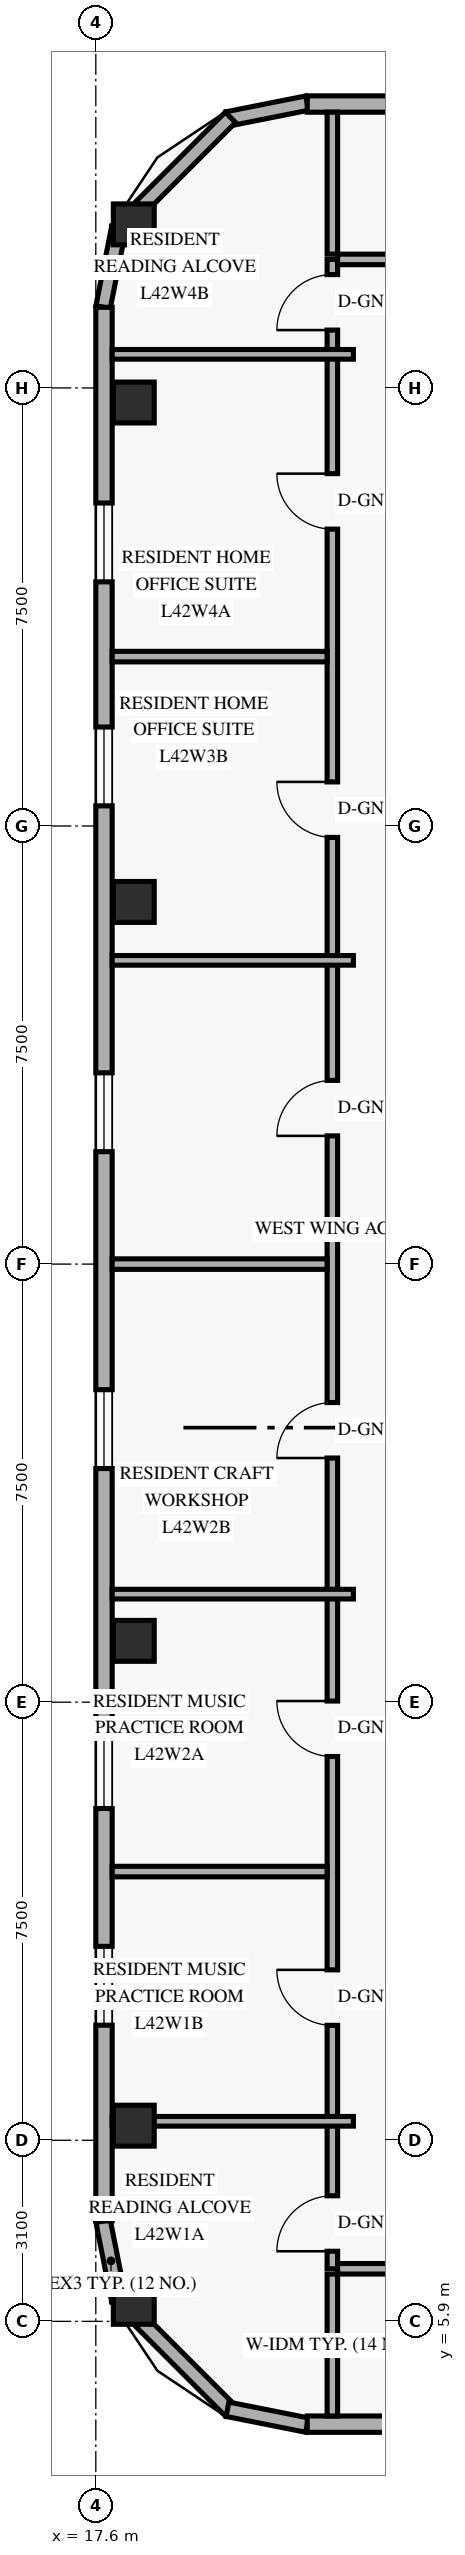
"""IFC4 building model, lengths in metres.
Left out: names, types, materials, properties, quantities, classifications, styles, units other than length and angle.
Written with IfcOpenShell. Run it as: python <this file> out.ifc"""

import sys

from ifc_helpers import new_model, si_unit, direction, frame, frame_2d, origin, origin_2d, place, context, subcontext, project, spatial, rectangle, extrude, element, fill, save


model = new_model("IFC4")
c1 = context("Model", 3, precision=1e-05, world=origin(), true_north=direction((0.0, 1.0)))
c2 = subcontext(c1, "Body", "Model", "MODEL_VIEW")
j1 = project(units=[si_unit("LENGTHUNIT", "METRE"), si_unit("PLANEANGLEUNIT", "RADIAN")], contexts=[c1])
p1 = place(None, origin())
s1 = spatial("IfcSite", under=j1, at=p1, CompositionType="ELEMENT")
p2 = place(p1, origin())
s2 = spatial("IfcBuilding", under=s1, at=p2, CompositionType="ELEMENT")
p3 = place(p2, frame((0.0, 0.0, 162.6)))
s3 = spatial("IfcBuildingStorey", under=s2, at=p3, CompositionType="ELEMENT", Elevation=162.6)
for number, where, z_axis, x_axis in (
    (1, (18.25, 6.2, 0.0), (0.0, 0.0, 1.0), (1.0, 0.0, 0.0)),
    (2, (18.25, 9.25, 0.0), (0.0, 0.0, 1.0), (1.0, 0.0, 0.0)),
    (3, (18.25, 17.55, 0.0), (0.0, 0.0, 1.0), (1.0, 0.0, 0.0)),
    (4, (18.25, 30.2, 0.0), (0.0, 0.0, 1.0), (1.0, 0.0, 0.0)),
    (5, (18.25, 38.75, 0.0), (0.0, 0.0, 1.0), (1.0, 0.0, 0.0)),
    (6, (18.25, 41.8, 0.0), (0.0, 0.0, 1.0), (1.0, 0.0, 0.0)),
):
    element("IfcColumn", number, at=place(p3, frame(where, z_axis=z_axis, x_axis=x_axis)), inside=s3, PredefinedType="COLUMN", context=c2, shape_type="SweptSolid", body=[
        extrude(rectangle(XDim=0.7, YDim=0.7, at=origin_2d()), origin(), (0.0, 0.0, 1.0), 3.6),
    ])
p4 = place(p3, frame((17.724, 7.616, 0.0), z_axis=(0.0, 0.0, 1.0), x_axis=(0.195135625965, -0.9807762678, 0.0)))
e7 = element("IfcWall", 7, at=p4, inside=s3, PredefinedType="SOLIDWALL", context=c2, shape_type="SweptSolid", body=[
    extrude(rectangle(XDim=1.389, YDim=0.25, at=frame_2d((0.694, 0.0))), origin(), (0.0, 0.0, 1.0), 3.36),
])
p5 = place(p3, frame((17.968, 6.305, 0.0), z_axis=(0.0, 0.0, 1.0), x_axis=(0.707106781187, -0.707106781187, 0.0)))
e8 = element("IfcWall", 8, at=p5, inside=s3, PredefinedType="SOLIDWALL", context=c2, shape_type="SweptSolid", body=[
    extrude(rectangle(XDim=2.739, YDim=0.25, at=frame_2d((1.37, 0.0))), origin(), (0.0, 0.0, 1.0), 3.36),
])
for number, where, z_axis, x_axis in (
    (9, (19.854, 4.395, 0.0), (0.0, 0.0, 1.0), (0.981, -0.195, 0.0)),
    (10, (21.217, 43.876, 0.0), (0.0, 0.0, 1.0), (-0.981, -0.195, 0.0)),
):
    element("IfcWall", number, at=place(p3, frame(where, z_axis=z_axis, x_axis=x_axis)), inside=s3, PredefinedType="SOLIDWALL", context=c2, shape_type="SweptSolid", body=[
        extrude(rectangle(XDim=1.389, YDim=0.25, at=frame_2d((0.694, 0.0))), origin(), (0.0, 0.0, 1.0), 3.36),
    ])
p6 = place(p3, frame((19.905, 43.632, 0.0), z_axis=(0.0, 0.0, 1.0), x_axis=(-0.707106781187, -0.707106781187, 0.0)))
e11 = element("IfcWall", 11, at=p6, inside=s3, PredefinedType="SOLIDWALL", context=c2, shape_type="SweptSolid", body=[
    extrude(rectangle(XDim=2.739, YDim=0.25, at=frame_2d((1.37, 0.0))), origin(), (0.0, 0.0, 1.0), 3.36),
])
p7 = place(p3, frame((17.995, 41.746, 0.0), z_axis=(0.0, 0.0, 1.0), x_axis=(-0.195135625965, -0.9807762678, 0.0)))
e12 = element("IfcWall", 12, at=p7, inside=s3, PredefinedType="SOLIDWALL", context=c2, shape_type="SweptSolid", body=[
    extrude(rectangle(XDim=1.389, YDim=0.25, at=frame_2d((0.694, 0.0))), origin(), (0.0, 0.0, 1.0), 3.36),
])
p8 = place(p3, frame((21.22, 4.14, 0.0), z_axis=(0.0, 0.0, 1.0), x_axis=(1.0, 0.0, 0.0)))
e13 = element("IfcWall", 13, at=p8, inside=s3, PredefinedType="SOLIDWALL", context=c2, shape_type="SweptSolid", body=[
    extrude(rectangle(XDim=5.43, YDim=0.28, at=frame_2d((2.715, 0.0))), origin(), (0.0, 0.0, 1.0), 3.36),
])
p9 = place(p8, frame((2.18, 0.0, 0.85)))
e14 = element("IfcOpeningElement", 14, at=p9, cuts=e13, PredefinedType="OPENING", context=c2, shape_type="SweptSolid", body=[
    extrude(rectangle(XDim=1.5, YDim=1.55, at=frame_2d((0.75, 0.775))), frame((0.0, 0.15, 0.0), z_axis=(0.0, -1.0, 0.0), x_axis=(1.0, 0.0, 0.0)), (0.0, 0.0, 1.0), 0.3),
])
p10 = place(p3, frame((54.98, 43.86, 0.0), z_axis=(0.0, 0.0, 1.0), x_axis=(-1.0, 0.0, 0.0)))
e15 = element("IfcWall", 15, at=p10, inside=s3, PredefinedType="SOLIDWALL", context=c2, shape_type="SweptSolid", body=[
    extrude(rectangle(XDim=33.76, YDim=0.28, at=frame_2d((16.88, 0.0))), origin(), (0.0, 0.0, 1.0), 3.36),
])
p11 = place(p10, frame((28.78, 0.0, 0.85)))
e16 = element("IfcOpeningElement", 16, at=p11, cuts=e15, PredefinedType="OPENING", context=c2, shape_type="SweptSolid", body=[
    extrude(rectangle(XDim=1.2, YDim=1.5, at=frame_2d((0.6, 0.75))), frame((0.0, 0.15, 0.0), z_axis=(0.0, -1.0, 0.0), x_axis=(1.0, 0.0, 0.0)), (0.0, 0.0, 1.0), 0.3),
])
p12 = place(p10, frame((21.895, 0.0, 0.85)))
e17 = element("IfcOpeningElement", 17, at=p12, cuts=e15, PredefinedType="OPENING", context=c2, shape_type="SweptSolid", body=[
    extrude(rectangle(XDim=1.2, YDim=1.5, at=frame_2d((0.6, 0.75))), frame((0.0, 0.15, 0.0), z_axis=(0.0, -1.0, 0.0), x_axis=(1.0, 0.0, 0.0)), (0.0, 0.0, 1.0), 0.3),
])
p13 = place(p10, frame((15.221, 0.0, 0.85)))
e18 = element("IfcOpeningElement", 18, at=p13, cuts=e15, PredefinedType="OPENING", context=c2, shape_type="SweptSolid", body=[
    extrude(rectangle(XDim=1.2, YDim=1.5, at=frame_2d((0.6, 0.75))), frame((0.0, 0.15, 0.0), z_axis=(0.0, -1.0, 0.0), x_axis=(1.0, 0.0, 0.0)), (0.0, 0.0, 1.0), 0.3),
])
p14 = place(p10, frame((8.031, 0.0, 0.85)))
e19 = element("IfcOpeningElement", 19, at=p14, cuts=e15, PredefinedType="OPENING", context=c2, shape_type="SweptSolid", body=[
    extrude(rectangle(XDim=1.2, YDim=1.5, at=frame_2d((0.6, 0.75))), frame((0.0, 0.15, 0.0), z_axis=(0.0, -1.0, 0.0), x_axis=(1.0, 0.0, 0.0)), (0.0, 0.0, 1.0), 0.3),
])
p15 = place(p10, frame((1.99, 0.0, 0.85)))
e20 = element("IfcOpeningElement", 20, at=p15, cuts=e15, PredefinedType="OPENING", context=c2, shape_type="SweptSolid", body=[
    extrude(rectangle(XDim=1.2, YDim=1.5, at=frame_2d((0.6, 0.75))), frame((0.0, 0.15, 0.0), z_axis=(0.0, -1.0, 0.0), x_axis=(1.0, 0.0, 0.0)), (0.0, 0.0, 1.0), 0.3),
])
p16 = place(p3, frame((17.74, 40.38, 0.0), z_axis=(0.0, 0.0, 1.0), x_axis=(0.0, -1.0, 0.0)))
e21 = element("IfcWall", 21, at=p16, inside=s3, PredefinedType="SOLIDWALL", context=c2, shape_type="SweptSolid", body=[
    extrude(rectangle(XDim=32.76, YDim=0.28, at=frame_2d((16.38, 0.0))), origin(), (0.0, 0.0, 1.0), 3.36),
])
p17 = place(p16, frame((28.06, 0.0, 0.85)))
e22 = element("IfcOpeningElement", 22, at=p17, cuts=e21, PredefinedType="OPENING", context=c2, shape_type="SweptSolid", body=[
    extrude(rectangle(XDim=1.35, YDim=1.55, at=frame_2d((0.675, 0.775))), frame((0.0, 0.15, 0.0), z_axis=(0.0, -1.0, 0.0), x_axis=(1.0, 0.0, 0.0)), (0.0, 0.0, 1.0), 0.3),
])
p18 = place(p16, frame((24.35, 0.0, 0.85)))
e23 = element("IfcOpeningElement", 23, at=p18, cuts=e21, PredefinedType="OPENING", context=c2, shape_type="SweptSolid", body=[
    extrude(rectangle(XDim=1.35, YDim=1.55, at=frame_2d((0.675, 0.775))), frame((0.0, 0.15, 0.0), z_axis=(0.0, -1.0, 0.0), x_axis=(1.0, 0.0, 0.0)), (0.0, 0.0, 1.0), 0.3),
])
p19 = place(p16, frame((18.53, 0.0, 0.85)))
e24 = element("IfcOpeningElement", 24, at=p19, cuts=e21, PredefinedType="OPENING", context=c2, shape_type="SweptSolid", body=[
    extrude(rectangle(XDim=1.35, YDim=1.55, at=frame_2d((0.675, 0.775))), frame((0.0, 0.15, 0.0), z_axis=(0.0, -1.0, 0.0), x_axis=(1.0, 0.0, 0.0)), (0.0, 0.0, 1.0), 0.3),
])
p20 = place(p16, frame((13.105, 0.0, 0.85)))
e25 = element("IfcOpeningElement", 25, at=p20, cuts=e21, PredefinedType="OPENING", context=c2, shape_type="SweptSolid", body=[
    extrude(rectangle(XDim=1.35, YDim=1.55, at=frame_2d((0.675, 0.775))), frame((0.0, 0.15, 0.0), z_axis=(0.0, -1.0, 0.0), x_axis=(1.0, 0.0, 0.0)), (0.0, 0.0, 1.0), 0.3),
])
p21 = place(p16, frame((7.185, 0.0, 0.85)))
e26 = element("IfcOpeningElement", 26, at=p21, cuts=e21, PredefinedType="OPENING", context=c2, shape_type="SweptSolid", body=[
    extrude(rectangle(XDim=1.35, YDim=1.55, at=frame_2d((0.675, 0.775))), frame((0.0, 0.15, 0.0), z_axis=(0.0, -1.0, 0.0), x_axis=(1.0, 0.0, 0.0)), (0.0, 0.0, 1.0), 0.3),
])
p22 = place(p16, frame((3.35, 0.0, 0.85)))
e27 = element("IfcOpeningElement", 27, at=p22, cuts=e21, PredefinedType="OPENING", context=c2, shape_type="SweptSolid", body=[
    extrude(rectangle(XDim=1.35, YDim=1.55, at=frame_2d((0.675, 0.775))), frame((0.0, 0.15, 0.0), z_axis=(0.0, -1.0, 0.0), x_axis=(1.0, 0.0, 0.0)), (0.0, 0.0, 1.0), 0.3),
])
p23 = place(p3, frame((21.65, 6.8, 0.0), z_axis=(0.0, 0.0, 1.0), x_axis=(0.0, 1.0, 0.0)))
e28 = element("IfcWall", 28, at=p23, inside=s3, PredefinedType="STANDARD", context=c2, shape_type="SweptSolid", body=[
    extrude(rectangle(XDim=34.4, YDim=0.18, at=frame_2d((17.2, 0.0))), origin(), (0.0, 0.0, 1.0), 2.73),
])
p24 = place(p23, frame((0.3, 0.0, 0.0)))
e29 = element("IfcOpeningElement", 29, at=p24, cuts=e28, PredefinedType="OPENING", context=c2, shape_type="SweptSolid", body=[
    extrude(rectangle(XDim=0.95, YDim=2.15, at=frame_2d((0.475, 1.075))), frame((0.0, 0.1, 0.0), z_axis=(0.0, -1.0, 0.0), x_axis=(1.0, 0.0, 0.0)), (0.0, 0.0, 1.0), 0.2),
])
p25 = place(p23, frame((4.167, 0.0, 0.0)))
e30 = element("IfcOpeningElement", 30, at=p25, cuts=e28, PredefinedType="OPENING", context=c2, shape_type="SweptSolid", body=[
    extrude(rectangle(XDim=0.95, YDim=2.15, at=frame_2d((0.475, 1.075))), frame((0.0, 0.1, 0.0), z_axis=(0.0, -1.0, 0.0), x_axis=(1.0, 0.0, 0.0)), (0.0, 0.0, 1.0), 0.2),
])
p26 = place(p23, frame((8.77, 0.0, 0.0)))
e31 = element("IfcOpeningElement", 31, at=p26, cuts=e28, PredefinedType="OPENING", context=c2, shape_type="SweptSolid", body=[
    extrude(rectangle(XDim=0.95, YDim=2.15, at=frame_2d((0.475, 1.075))), frame((0.0, 0.1, 0.0), z_axis=(0.0, -1.0, 0.0), x_axis=(1.0, 0.0, 0.0)), (0.0, 0.0, 1.0), 0.2),
])
p27 = place(p23, frame((13.88, 0.0, 0.0)))
e32 = element("IfcOpeningElement", 32, at=p27, cuts=e28, PredefinedType="OPENING", context=c2, shape_type="SweptSolid", body=[
    extrude(rectangle(XDim=0.95, YDim=2.15, at=frame_2d((0.475, 1.075))), frame((0.0, 0.1, 0.0), z_axis=(0.0, -1.0, 0.0), x_axis=(1.0, 0.0, 0.0)), (0.0, 0.0, 1.0), 0.2),
])
p28 = place(p23, frame((19.395, 0.0, 0.0)))
e33 = element("IfcOpeningElement", 33, at=p28, cuts=e28, PredefinedType="OPENING", context=c2, shape_type="SweptSolid", body=[
    extrude(rectangle(XDim=0.95, YDim=2.15, at=frame_2d((0.475, 1.075))), frame((0.0, 0.1, 0.0), z_axis=(0.0, -1.0, 0.0), x_axis=(1.0, 0.0, 0.0)), (0.0, 0.0, 1.0), 0.2),
])
p29 = place(p23, frame((24.505, 0.0, 0.0)))
e34 = element("IfcOpeningElement", 34, at=p29, cuts=e28, PredefinedType="OPENING", context=c2, shape_type="SweptSolid", body=[
    extrude(rectangle(XDim=0.95, YDim=2.15, at=frame_2d((0.475, 1.075))), frame((0.0, 0.1, 0.0), z_axis=(0.0, -1.0, 0.0), x_axis=(1.0, 0.0, 0.0)), (0.0, 0.0, 1.0), 0.2),
])
p30 = place(p23, frame((29.782, 0.0, 0.0)))
e35 = element("IfcOpeningElement", 35, at=p30, cuts=e28, PredefinedType="OPENING", context=c2, shape_type="SweptSolid", body=[
    extrude(rectangle(XDim=0.95, YDim=2.15, at=frame_2d((0.475, 1.075))), frame((0.0, 0.1, 0.0), z_axis=(0.0, -1.0, 0.0), x_axis=(1.0, 0.0, 0.0)), (0.0, 0.0, 1.0), 0.2),
])
p31 = place(p23, frame((33.19, 0.0, 0.0)))
e36 = element("IfcOpeningElement", 36, at=p31, cuts=e28, PredefinedType="OPENING", context=c2, shape_type="SweptSolid", body=[
    extrude(rectangle(XDim=0.95, YDim=2.15, at=frame_2d((0.475, 1.075))), frame((0.0, 0.1, 0.0), z_axis=(0.0, -1.0, 0.0), x_axis=(1.0, 0.0, 0.0)), (0.0, 0.0, 1.0), 0.2),
])
p32 = place(p3, frame((21.74, 6.8, 0.0), z_axis=(0.0, 0.0, 1.0), x_axis=(1.0, 0.0, 0.0)))
e37 = element("IfcWall", 37, at=p32, inside=s3, PredefinedType="STANDARD", context=c2, shape_type="SweptSolid", body=[
    extrude(rectangle(XDim=13.68, YDim=0.18, at=frame_2d((6.84, 0.0))), origin(), (0.0, 0.0, 1.0), 2.73),
])
p33 = place(p32, frame((0.97, 0.0, 0.0)))
e38 = element("IfcOpeningElement", 38, at=p33, cuts=e37, PredefinedType="OPENING", context=c2, shape_type="SweptSolid", body=[
    extrude(rectangle(XDim=0.95, YDim=2.15, at=frame_2d((0.475, 1.075))), frame((0.0, 0.1, 0.0), z_axis=(0.0, -1.0, 0.0), x_axis=(1.0, 0.0, 0.0)), (0.0, 0.0, 1.0), 0.2),
])
p34 = place(p32, frame((9.11, 0.0, 0.0)))
e39 = element("IfcOpeningElement", 39, at=p34, cuts=e37, PredefinedType="OPENING", context=c2, shape_type="SweptSolid", body=[
    extrude(rectangle(XDim=0.95, YDim=2.15, at=frame_2d((0.475, 1.075))), frame((0.0, 0.1, 0.0), z_axis=(0.0, -1.0, 0.0), x_axis=(1.0, 0.0, 0.0)), (0.0, 0.0, 1.0), 0.2),
])
p35 = place(p3, frame((21.74, 41.2, 0.0), z_axis=(0.0, 0.0, 1.0), x_axis=(1.0, 0.0, 0.0)))
e40 = element("IfcWall", 40, at=p35, inside=s3, PredefinedType="STANDARD", context=c2, shape_type="SweptSolid", body=[
    extrude(rectangle(XDim=13.68, YDim=0.18, at=frame_2d((6.84, 0.0))), origin(), (0.0, 0.0, 1.0), 2.73),
])
p36 = place(p35, frame((2.95, 0.0, 0.0)))
e41 = element("IfcOpeningElement", 41, at=p36, cuts=e40, PredefinedType="OPENING", context=c2, shape_type="SweptSolid", body=[
    extrude(rectangle(XDim=0.95, YDim=2.15, at=frame_2d((0.475, 1.075))), frame((0.0, 0.1, 0.0), z_axis=(0.0, -1.0, 0.0), x_axis=(1.0, 0.0, 0.0)), (0.0, 0.0, 1.0), 0.2),
])
p37 = place(p35, frame((10.11, 0.0, 0.0)))
e42 = element("IfcOpeningElement", 42, at=p37, cuts=e40, PredefinedType="OPENING", context=c2, shape_type="SweptSolid", body=[
    extrude(rectangle(XDim=0.95, YDim=2.15, at=frame_2d((0.475, 1.075))), frame((0.0, 0.1, 0.0), z_axis=(0.0, -1.0, 0.0), x_axis=(1.0, 0.0, 0.0)), (0.0, 0.0, 1.0), 0.2),
])
for number, where, z_axis, x_axis in (
    (43, (21.65, 4.28, 0.0), (0.0, 0.0, 1.0), (0.0, 1.0, 0.0)),
    (44, (21.65, 41.29, 0.0), (0.0, 0.0, 1.0), (0.0, 1.0, 0.0)),
):
    element("IfcWall", number, at=place(p3, frame(where, z_axis=z_axis, x_axis=x_axis)), inside=s3, PredefinedType="PARTITIONING", context=c2, shape_type="SweptSolid", body=[
        extrude(rectangle(XDim=2.43, YDim=0.18, at=frame_2d((1.215, 0.0))), origin(), (0.0, 0.0, 1.0), 2.879),
    ])
p38 = place(p3, frame((17.88, 9.325, 0.0), z_axis=(0.0, 0.0, 1.0), x_axis=(1.0, 0.0, 0.0)))
e45 = element("IfcWall", 45, at=p38, inside=s3, PredefinedType="PARTITIONING", context=c2, shape_type="SweptSolid", body=[
    extrude(rectangle(XDim=4.13, YDim=0.165, at=frame_2d((2.065, 0.0))), origin(), (0.0, 0.0, 1.0), 2.73),
])
p39 = place(p3, frame((17.88, 13.6, 0.0), z_axis=(0.0, 0.0, 1.0), x_axis=(1.0, 0.0, 0.0)))
e46 = element("IfcWall", 46, at=p39, inside=s3, PredefinedType="PARTITIONING", context=c2, shape_type="SweptSolid", body=[
    extrude(rectangle(XDim=3.68, YDim=0.18, at=frame_2d((1.84, 0.0))), origin(), (0.0, 0.0, 1.0), 2.879),
])
p40 = place(p3, frame((17.88, 18.35, 0.0), z_axis=(0.0, 0.0, 1.0), x_axis=(1.0, 0.0, 0.0)))
e47 = element("IfcWall", 47, at=p40, inside=s3, PredefinedType="PARTITIONING", context=c2, shape_type="SweptSolid", body=[
    extrude(rectangle(XDim=4.13, YDim=0.165, at=frame_2d((2.065, 0.0))), origin(), (0.0, 0.0, 1.0), 2.879),
])
p41 = place(p3, frame((17.88, 24.0, 0.0), z_axis=(0.0, 0.0, 1.0), x_axis=(1.0, 0.0, 0.0)))
e48 = element("IfcWall", 48, at=p41, inside=s3, PredefinedType="PARTITIONING", context=c2, shape_type="SweptSolid", body=[
    extrude(rectangle(XDim=3.68, YDim=0.18, at=frame_2d((1.84, 0.0))), origin(), (0.0, 0.0, 1.0), 2.879),
])
p42 = place(p3, frame((17.88, 29.2, 0.0), z_axis=(0.0, 0.0, 1.0), x_axis=(1.0, 0.0, 0.0)))
e49 = element("IfcWall", 49, at=p42, inside=s3, PredefinedType="PARTITIONING", context=c2, shape_type="SweptSolid", body=[
    extrude(rectangle(XDim=4.13, YDim=0.165, at=frame_2d((2.065, 0.0))), origin(), (0.0, 0.0, 1.0), 2.879),
])
p43 = place(p3, frame((17.88, 34.4, 0.0), z_axis=(0.0, 0.0, 1.0), x_axis=(1.0, 0.0, 0.0)))
e50 = element("IfcWall", 50, at=p43, inside=s3, PredefinedType="PARTITIONING", context=c2, shape_type="SweptSolid", body=[
    extrude(rectangle(XDim=3.68, YDim=0.18, at=frame_2d((1.84, 0.0))), origin(), (0.0, 0.0, 1.0), 2.879),
])
p44 = place(p3, frame((17.88, 39.575, 0.0), z_axis=(0.0, 0.0, 1.0), x_axis=(1.0, 0.0, 0.0)))
e51 = element("IfcWall", 51, at=p44, inside=s3, PredefinedType="PARTITIONING", context=c2, shape_type="SweptSolid", body=[
    extrude(rectangle(XDim=4.13, YDim=0.165, at=frame_2d((2.065, 0.0))), origin(), (0.0, 0.0, 1.0), 2.879),
])
p45 = place(p17, origin())
e52 = element("IfcWindow", 52, at=p45, inside=s3, PartitioningType="SINGLE_PANEL", PredefinedType="WINDOW", context=c2, shape_type="SweptSolid", body=[
    extrude(rectangle(XDim=1.35, YDim=1.55, at=frame_2d((0.675, 0.775))), frame((0.0, 0.03, 0.0), z_axis=(0.0, -1.0, 0.0), x_axis=(1.0, 0.0, 0.0)), (0.0, 0.0, 1.0), 0.06),
])
fill(e22, e52)
p46 = place(p18, origin())
e53 = element("IfcWindow", 53, at=p46, inside=s3, PartitioningType="SINGLE_PANEL", PredefinedType="WINDOW", context=c2, shape_type="SweptSolid", body=[
    extrude(rectangle(XDim=1.35, YDim=1.55, at=frame_2d((0.675, 0.775))), frame((0.0, 0.03, 0.0), z_axis=(0.0, -1.0, 0.0), x_axis=(1.0, 0.0, 0.0)), (0.0, 0.0, 1.0), 0.06),
])
fill(e23, e53)
p47 = place(p19, origin())
e54 = element("IfcWindow", 54, at=p47, inside=s3, PartitioningType="SINGLE_PANEL", PredefinedType="WINDOW", context=c2, shape_type="SweptSolid", body=[
    extrude(rectangle(XDim=1.35, YDim=1.55, at=frame_2d((0.675, 0.775))), frame((0.0, 0.03, 0.0), z_axis=(0.0, -1.0, 0.0), x_axis=(1.0, 0.0, 0.0)), (0.0, 0.0, 1.0), 0.06),
])
fill(e24, e54)
p48 = place(p20, origin())
e55 = element("IfcWindow", 55, at=p48, inside=s3, PartitioningType="SINGLE_PANEL", PredefinedType="WINDOW", context=c2, shape_type="SweptSolid", body=[
    extrude(rectangle(XDim=1.35, YDim=1.55, at=frame_2d((0.675, 0.775))), frame((0.0, 0.03, 0.0), z_axis=(0.0, -1.0, 0.0), x_axis=(1.0, 0.0, 0.0)), (0.0, 0.0, 1.0), 0.06),
])
fill(e25, e55)
p49 = place(p21, origin())
e56 = element("IfcWindow", 56, at=p49, inside=s3, PartitioningType="SINGLE_PANEL", PredefinedType="WINDOW", context=c2, shape_type="SweptSolid", body=[
    extrude(rectangle(XDim=1.35, YDim=1.55, at=frame_2d((0.675, 0.775))), frame((0.0, 0.03, 0.0), z_axis=(0.0, -1.0, 0.0), x_axis=(1.0, 0.0, 0.0)), (0.0, 0.0, 1.0), 0.06),
])
fill(e26, e56)
p50 = place(p22, origin())
e57 = element("IfcWindow", 57, at=p50, inside=s3, PartitioningType="SINGLE_PANEL", PredefinedType="WINDOW", context=c2, shape_type="SweptSolid", body=[
    extrude(rectangle(XDim=1.35, YDim=1.55, at=frame_2d((0.675, 0.775))), frame((0.0, 0.03, 0.0), z_axis=(0.0, -1.0, 0.0), x_axis=(1.0, 0.0, 0.0)), (0.0, 0.0, 1.0), 0.06),
])
fill(e27, e57)
p51 = place(p24, origin())
e58 = element("IfcDoor", 58, at=p51, inside=s3, OperationType="SINGLE_SWING_LEFT", PredefinedType="DOOR", context=c2, shape_type="SweptSolid", body=[
    extrude(rectangle(XDim=0.95, YDim=2.15, at=frame_2d((0.475, 1.075))), frame((0.0, 0.025, 0.0), z_axis=(0.0, -1.0, 0.0), x_axis=(1.0, 0.0, 0.0)), (0.0, 0.0, 1.0), 0.05),
])
fill(e29, e58)
p52 = place(p25, origin())
e59 = element("IfcDoor", 59, at=p52, inside=s3, OperationType="SINGLE_SWING_RIGHT", PredefinedType="DOOR", context=c2, shape_type="SweptSolid", body=[
    extrude(rectangle(XDim=0.95, YDim=2.15, at=frame_2d((0.475, 1.075))), frame((0.0, 0.025, 0.0), z_axis=(0.0, -1.0, 0.0), x_axis=(1.0, 0.0, 0.0)), (0.0, 0.0, 1.0), 0.05),
])
fill(e30, e59)
p53 = place(p26, origin())
e60 = element("IfcDoor", 60, at=p53, inside=s3, OperationType="SINGLE_SWING_RIGHT", PredefinedType="DOOR", context=c2, shape_type="SweptSolid", body=[
    extrude(rectangle(XDim=0.95, YDim=2.15, at=frame_2d((0.475, 1.075))), frame((0.0, 0.025, 0.0), z_axis=(0.0, -1.0, 0.0), x_axis=(1.0, 0.0, 0.0)), (0.0, 0.0, 1.0), 0.05),
])
fill(e31, e60)
p54 = place(p27, origin())
e61 = element("IfcDoor", 61, at=p54, inside=s3, OperationType="SINGLE_SWING_LEFT", PredefinedType="DOOR", context=c2, shape_type="SweptSolid", body=[
    extrude(rectangle(XDim=0.95, YDim=2.15, at=frame_2d((0.475, 1.075))), frame((0.0, 0.025, 0.0), z_axis=(0.0, -1.0, 0.0), x_axis=(1.0, 0.0, 0.0)), (0.0, 0.0, 1.0), 0.05),
])
fill(e32, e61)
p55 = place(p28, origin())
e62 = element("IfcDoor", 62, at=p55, inside=s3, OperationType="SINGLE_SWING_LEFT", PredefinedType="DOOR", context=c2, shape_type="SweptSolid", body=[
    extrude(rectangle(XDim=0.95, YDim=2.15, at=frame_2d((0.475, 1.075))), frame((0.0, 0.025, 0.0), z_axis=(0.0, -1.0, 0.0), x_axis=(1.0, 0.0, 0.0)), (0.0, 0.0, 1.0), 0.05),
])
fill(e33, e62)
p56 = place(p29, origin())
e63 = element("IfcDoor", 63, at=p56, inside=s3, OperationType="SINGLE_SWING_RIGHT", PredefinedType="DOOR", context=c2, shape_type="SweptSolid", body=[
    extrude(rectangle(XDim=0.95, YDim=2.15, at=frame_2d((0.475, 1.075))), frame((0.0, 0.025, 0.0), z_axis=(0.0, -1.0, 0.0), x_axis=(1.0, 0.0, 0.0)), (0.0, 0.0, 1.0), 0.05),
])
fill(e34, e63)
p57 = place(p30, origin())
e64 = element("IfcDoor", 64, at=p57, inside=s3, OperationType="SINGLE_SWING_RIGHT", PredefinedType="DOOR", context=c2, shape_type="SweptSolid", body=[
    extrude(rectangle(XDim=0.95, YDim=2.15, at=frame_2d((0.475, 1.075))), frame((0.0, 0.025, 0.0), z_axis=(0.0, -1.0, 0.0), x_axis=(1.0, 0.0, 0.0)), (0.0, 0.0, 1.0), 0.05),
])
fill(e35, e64)
p58 = place(p31, origin())
e65 = element("IfcDoor", 65, at=p58, inside=s3, OperationType="SINGLE_SWING_LEFT", PredefinedType="DOOR", context=c2, shape_type="SweptSolid", body=[
    extrude(rectangle(XDim=0.95, YDim=2.15, at=frame_2d((0.475, 1.075))), frame((0.0, 0.025, 0.0), z_axis=(0.0, -1.0, 0.0), x_axis=(1.0, 0.0, 0.0)), (0.0, 0.0, 1.0), 0.05),
])
fill(e36, e65)
save(model, sys.argv[1])
